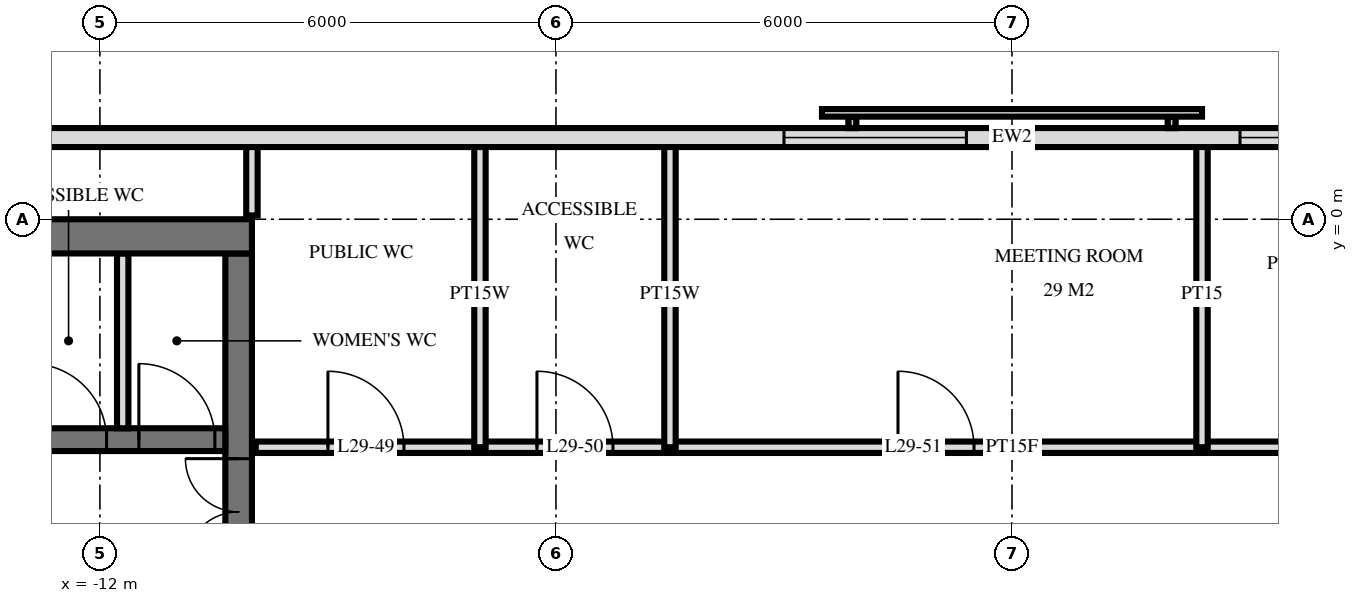
"""IFC4 building model, lengths in metres.
Left out: names, types, materials, properties, quantities, classifications, styles, units other than length and angle.
Written with IfcOpenShell. Run it as: python <this file> out.ifc"""

import sys

from ifc_helpers import new_model, si_unit, direction, frame, frame_2d, origin, place, context, subcontext, project, spatial, rectangle, extrude, element, fill, save


model = new_model("IFC4")
c1 = context("Model", 3, precision=1e-05, world=origin(), true_north=direction((0.0, 1.0)))
c2 = subcontext(c1, "Body", "Model", "MODEL_VIEW")
j1 = project(units=[si_unit("LENGTHUNIT", "METRE"), si_unit("PLANEANGLEUNIT", "RADIAN")], contexts=[c1])
p1 = place(None, origin())
s1 = spatial("IfcSite", under=j1, at=p1, CompositionType="ELEMENT")
p2 = place(p1, origin())
s2 = spatial("IfcBuilding", under=s1, at=p2, CompositionType="ELEMENT")
p3 = place(p2, frame((0.0, 0.0, 116.4)))
s3 = spatial("IfcBuildingStorey", under=s2, at=p3, CompositionType="ELEMENT", Elevation=116.4)
p4 = place(p3, frame((-24.5, -0.225, 0.0), z_axis=(0.0, 0.0, 1.0), x_axis=(1.0, 0.0, 0.0)))
e1 = element("IfcWall", 1, at=p4, inside=s3, PredefinedType="SHEAR", context=c2, shape_type="SweptSolid", body=[
    extrude(rectangle(XDim=14.5, YDim=0.45, at=frame_2d((7.25, 0.0))), origin(), (0.0, 0.0, 1.0), 3.6),
])
p5 = place(p3, frame((-10.175, -14.55, 0.0), z_axis=(0.0, 0.0, 1.0), x_axis=(0.0, 1.0, 0.0)))
e2 = element("IfcWall", 2, at=p5, inside=s3, PredefinedType="SHEAR", context=c2, shape_type="SweptSolid", body=[
    extrude(rectangle(XDim=14.1, YDim=0.35, at=frame_2d((7.05, 0.0))), origin(), (0.0, 0.0, 1.0), 3.6),
])
p6 = place(p5, frame((8.4, 0.0, 0.0)))
e3 = element("IfcOpeningElement", 3, at=p6, cuts=e2, PredefinedType="OPENING", context=c2, shape_type="SweptSolid", body=[
    extrude(rectangle(XDim=1.4, YDim=2.4, at=frame_2d((0.7, 1.2))), frame((0.0, 0.185, 0.0), z_axis=(0.0, -1.0, 0.0), x_axis=(1.0, 0.0, 0.0)), (0.0, 0.0, 1.0), 0.37),
])
p7 = place(p5, frame((10.0, 0.0, 0.0)))
e4 = element("IfcOpeningElement", 4, at=p7, cuts=e2, PredefinedType="OPENING", context=c2, shape_type="SweptSolid", body=[
    extrude(rectangle(XDim=1.4, YDim=2.4, at=frame_2d((0.7, 1.2))), frame((0.0, 0.185, 0.0), z_axis=(0.0, -1.0, 0.0), x_axis=(1.0, 0.0, 0.0)), (0.0, 0.0, 1.0), 0.37),
])
p8 = place(p5, frame((4.0, 0.0, 0.0)))
e5 = element("IfcOpeningElement", 5, at=p8, cuts=e2, PredefinedType="OPENING", context=c2, shape_type="SweptSolid", body=[
    extrude(rectangle(XDim=1.2, YDim=2.1, at=frame_2d((0.6, 1.05))), frame((0.0, 0.185, 0.0), z_axis=(0.0, -1.0, 0.0), x_axis=(1.0, 0.0, 0.0)), (0.0, 0.0, 1.0), 0.37),
])
p9 = place(p3, frame((-24.05, -2.9, 0.0), z_axis=(0.0, 0.0, 1.0), x_axis=(1.0, 0.0, 0.0)))
e6 = element("IfcWall", 6, at=p9, inside=s3, PredefinedType="SHEAR", context=c2, shape_type="SweptSolid", body=[
    extrude(rectangle(XDim=13.7, YDim=0.3, at=frame_2d((6.85, 0.0))), origin(), (0.0, 0.0, 1.0), 3.6),
])
p10 = place(p9, frame((0.55, 0.0, 0.0)))
e7 = element("IfcOpeningElement", 7, at=p10, cuts=e6, PredefinedType="OPENING", context=c2, shape_type="SweptSolid", body=[
    extrude(rectangle(XDim=1.1, YDim=2.1, at=frame_2d((0.55, 1.05))), frame((0.0, 0.16, 0.0), z_axis=(0.0, -1.0, 0.0), x_axis=(1.0, 0.0, 0.0)), (0.0, 0.0, 1.0), 0.32),
])
p11 = place(p9, frame((6.613, 0.0, 0.0)))
e8 = element("IfcOpeningElement", 8, at=p11, cuts=e6, PredefinedType="OPENING", context=c2, shape_type="SweptSolid", body=[
    extrude(rectangle(XDim=0.9, YDim=2.1, at=frame_2d((0.45, 1.05))), frame((0.0, 0.16, 0.0), z_axis=(0.0, -1.0, 0.0), x_axis=(1.0, 0.0, 0.0)), (0.0, 0.0, 1.0), 0.32),
])
p12 = place(p9, frame((5.188, 0.0, 0.0)))
e9 = element("IfcOpeningElement", 9, at=p12, cuts=e6, PredefinedType="OPENING", context=c2, shape_type="SweptSolid", body=[
    extrude(rectangle(XDim=0.9, YDim=2.1, at=frame_2d((0.45, 1.05))), frame((0.0, 0.16, 0.0), z_axis=(0.0, -1.0, 0.0), x_axis=(1.0, 0.0, 0.0)), (0.0, 0.0, 1.0), 0.32),
])
p13 = place(p9, frame((12.562, 0.0, 0.0)))
e10 = element("IfcOpeningElement", 10, at=p13, cuts=e6, PredefinedType="OPENING", context=c2, shape_type="SweptSolid", body=[
    extrude(rectangle(XDim=1.0, YDim=2.1, at=frame_2d((0.5, 1.05))), frame((0.0, 0.16, 0.0), z_axis=(0.0, -1.0, 0.0), x_axis=(1.0, 0.0, 0.0)), (0.0, 0.0, 1.0), 0.32),
])
p14 = place(p9, frame((11.137, 0.0, 0.0)))
e11 = element("IfcOpeningElement", 11, at=p14, cuts=e6, PredefinedType="OPENING", context=c2, shape_type="SweptSolid", body=[
    extrude(rectangle(XDim=1.0, YDim=2.1, at=frame_2d((0.5, 1.05))), frame((0.0, 0.16, 0.0), z_axis=(0.0, -1.0, 0.0), x_axis=(1.0, 0.0, 0.0)), (0.0, 0.0, 1.0), 0.32),
])
p15 = place(p9, frame((8.85, 0.0, 0.0)))
e12 = element("IfcOpeningElement", 12, at=p15, cuts=e6, PredefinedType="OPENING", context=c2, shape_type="SweptSolid", body=[
    extrude(rectangle(XDim=1.0, YDim=2.1, at=frame_2d((0.5, 1.05))), frame((0.0, 0.16, 0.0), z_axis=(0.0, -1.0, 0.0), x_axis=(1.0, 0.0, 0.0)), (0.0, 0.0, 1.0), 0.32),
])
p16 = place(p9, frame((3.0, 0.0, 0.0)))
e13 = element("IfcOpeningElement", 13, at=p16, cuts=e6, PredefinedType="OPENING", context=c2, shape_type="SweptSolid", body=[
    extrude(rectangle(XDim=1.0, YDim=2.1, at=frame_2d((0.5, 1.05))), frame((0.0, 0.16, 0.0), z_axis=(0.0, -1.0, 0.0), x_axis=(1.0, 0.0, 0.0)), (0.0, 0.0, 1.0), 0.32),
])
p17 = place(p3, frame((23.675, 1.075, 0.0), z_axis=(0.0, 0.0, 1.0), x_axis=(-1.0, 0.0, 0.0)))
e14 = element("IfcWall", 14, at=p17, inside=s3, PredefinedType="SOLIDWALL", context=c2, shape_type="SweptSolid", body=[
    extrude(rectangle(XDim=47.351, YDim=0.25, at=frame_2d((23.675, 0.0))), origin(), (0.0, 0.0, 1.0), 3.32),
])
p18 = place(p17, frame((15.275, 0.0, 0.3)))
e15 = element("IfcOpeningElement", 15, at=p18, cuts=e14, PredefinedType="OPENING", context=c2, shape_type="SweptSolid", body=[
    extrude(rectangle(XDim=2.4, YDim=2.1, at=frame_2d((1.2, 1.05))), frame((0.0, 0.135, 0.0), z_axis=(0.0, -1.0, 0.0), x_axis=(1.0, 0.0, 0.0)), (0.0, 0.0, 1.0), 0.27),
])
p19 = place(p17, frame((18.275, 0.0, 0.3)))
e16 = element("IfcOpeningElement", 16, at=p19, cuts=e14, PredefinedType="OPENING", context=c2, shape_type="SweptSolid", body=[
    extrude(rectangle(XDim=2.4, YDim=2.1, at=frame_2d((1.2, 1.05))), frame((0.0, 0.135, 0.0), z_axis=(0.0, -1.0, 0.0), x_axis=(1.0, 0.0, 0.0)), (0.0, 0.0, 1.0), 0.27),
])
p20 = place(p17, frame((24.275, 0.0, 0.3)))
e17 = element("IfcOpeningElement", 17, at=p20, cuts=e14, PredefinedType="OPENING", context=c2, shape_type="SweptSolid", body=[
    extrude(rectangle(XDim=2.4, YDim=2.1, at=frame_2d((1.2, 1.05))), frame((0.0, 0.135, 0.0), z_axis=(0.0, -1.0, 0.0), x_axis=(1.0, 0.0, 0.0)), (0.0, 0.0, 1.0), 0.27),
])
p21 = place(p3, frame((-11.7, -2.75, 0.0), z_axis=(0.0, 0.0, 1.0), x_axis=(0.0, 1.0, 0.0)))
e18 = element("IfcWall", 18, at=p21, inside=s3, PredefinedType="PARTITIONING", context=c2, shape_type="SweptSolid", body=[
    extrude(rectangle(XDim=2.3, YDim=0.15, at=frame_2d((1.15, 0.0))), origin(), (0.0, 0.0, 1.0), 3.3),
])
p22 = place(p3, frame((2.5, -3.0, 0.0), z_axis=(0.0, 0.0, 1.0), x_axis=(0.0, 1.0, 0.0)))
e19 = element("IfcWall", 19, at=p22, inside=s3, PredefinedType="PARTITIONING", context=c2, shape_type="SweptSolid", body=[
    extrude(rectangle(XDim=4.02, YDim=0.15, at=frame_2d((2.01, 0.0))), origin(), (0.0, 0.0, 1.0), 3.32),
])
for number, where, z_axis, x_axis in (
    (20, (-4.5, -3.0, 0.0), (0.0, 0.0, 1.0), (0.0, 1.0, 0.0)),
    (21, (-7.0, -3.0, 0.0), (0.0, 0.0, 1.0), (0.0, 1.0, 0.0)),
):
    element("IfcWall", number, at=place(p3, frame(where, z_axis=z_axis, x_axis=x_axis)), inside=s3, PredefinedType="PLUMBINGWALL", context=c2, shape_type="SweptSolid", body=[
        extrude(rectangle(XDim=4.02, YDim=0.15, at=frame_2d((2.01, 0.0))), origin(), (0.0, 0.0, 1.0), 3.32),
    ])
p23 = place(p3, frame((-10.0, 0.05, 0.0), z_axis=(0.0, 0.0, 1.0), x_axis=(0.0, 1.0, 0.0)))
e22 = element("IfcWall", 22, at=p23, inside=s3, PredefinedType="PLUMBINGWALL", context=c2, shape_type="SweptSolid", body=[
    extrude(rectangle(XDim=0.97, YDim=0.15, at=frame_2d((0.485, 0.0))), origin(), (0.0, 0.0, 1.0), 3.32),
])
p24 = place(p3, frame((-9.95, -3.0, 0.0), z_axis=(0.0, 0.0, 1.0), x_axis=(1.0, 0.0, 0.0)))
e23 = element("IfcWall", 23, at=p24, inside=s3, PredefinedType="PARTITIONING", context=c2, shape_type="SweptSolid", body=[
    extrude(rectangle(XDim=19.9, YDim=0.15, at=frame_2d((9.95, 0.0))), origin(), (0.0, 0.0, 1.0), 3.32),
])
p25 = place(p24, frame((0.95, 0.0, 0.0)))
e24 = element("IfcOpeningElement", 24, at=p25, cuts=e23, PredefinedType="OPENING", context=c2, shape_type="SweptSolid", body=[
    extrude(rectangle(XDim=1.0, YDim=2.1, at=frame_2d((0.5, 1.05))), frame((0.0, 0.085, 0.0), z_axis=(0.0, -1.0, 0.0), x_axis=(1.0, 0.0, 0.0)), (0.0, 0.0, 1.0), 0.17),
])
p26 = place(p24, frame((3.7, 0.0, 0.0)))
e25 = element("IfcOpeningElement", 25, at=p26, cuts=e23, PredefinedType="OPENING", context=c2, shape_type="SweptSolid", body=[
    extrude(rectangle(XDim=1.0, YDim=2.1, at=frame_2d((0.5, 1.05))), frame((0.0, 0.085, 0.0), z_axis=(0.0, -1.0, 0.0), x_axis=(1.0, 0.0, 0.0)), (0.0, 0.0, 1.0), 0.17),
])
p27 = place(p24, frame((8.45, 0.0, 0.0)))
e26 = element("IfcOpeningElement", 26, at=p27, cuts=e23, PredefinedType="OPENING", context=c2, shape_type="SweptSolid", body=[
    extrude(rectangle(XDim=1.0, YDim=2.1, at=frame_2d((0.5, 1.05))), frame((0.0, 0.085, 0.0), z_axis=(0.0, -1.0, 0.0), x_axis=(1.0, 0.0, 0.0)), (0.0, 0.0, 1.0), 0.17),
])
p28 = place(p24, frame((15.7, 0.0, 0.0)))
e27 = element("IfcOpeningElement", 27, at=p28, cuts=e23, PredefinedType="OPENING", context=c2, shape_type="SweptSolid", body=[
    extrude(rectangle(XDim=1.0, YDim=2.1, at=frame_2d((0.5, 1.05))), frame((0.0, 0.085, 0.0), z_axis=(0.0, -1.0, 0.0), x_axis=(1.0, 0.0, 0.0)), (0.0, 0.0, 1.0), 0.17),
])
p29 = place(p19, origin())
e28 = element("IfcWindow", 28, at=p29, inside=s3, PartitioningType="SINGLE_PANEL", PredefinedType="WINDOW", context=c2, shape_type="SweptSolid", body=[
    extrude(rectangle(XDim=2.4, YDim=2.1, at=frame_2d((1.2, 1.05))), frame((0.0, 0.03, 0.0), z_axis=(0.0, -1.0, 0.0), x_axis=(1.0, 0.0, 0.0)), (0.0, 0.0, 1.0), 0.06),
])
fill(e16, e28)
p30 = place(p20, origin())
e29 = element("IfcWindow", 29, at=p30, inside=s3, PartitioningType="SINGLE_PANEL", PredefinedType="WINDOW", context=c2, shape_type="SweptSolid", body=[
    extrude(rectangle(XDim=2.4, YDim=2.1, at=frame_2d((1.2, 1.05))), frame((0.0, 0.03, 0.0), z_axis=(0.0, -1.0, 0.0), x_axis=(1.0, 0.0, 0.0)), (0.0, 0.0, 1.0), 0.06),
])
fill(e17, e29)
p31 = place(p7, origin())
e30 = element("IfcDoor", 30, at=p31, inside=s3, OperationType="DOUBLE_DOOR_SINGLE_SWING", PredefinedType="DOOR", context=c2, shape_type="SweptSolid", body=[
    extrude(rectangle(XDim=1.4, YDim=2.4, at=frame_2d((0.7, 1.2))), frame((0.0, 0.025, 0.0), z_axis=(0.0, -1.0, 0.0), x_axis=(1.0, 0.0, 0.0)), (0.0, 0.0, 1.0), 0.05),
])
fill(e4, e30)
p32 = place(p13, origin())
e31 = element("IfcDoor", 31, at=p32, inside=s3, OperationType="SINGLE_SWING_RIGHT", PredefinedType="DOOR", context=c2, shape_type="SweptSolid", body=[
    extrude(rectangle(XDim=1.0, YDim=2.1, at=frame_2d((0.5, 1.05))), frame((0.0, 0.025, 0.0), z_axis=(0.0, -1.0, 0.0), x_axis=(1.0, 0.0, 0.0)), (0.0, 0.0, 1.0), 0.05),
])
fill(e10, e31)
p33 = place(p14, origin())
e32 = element("IfcDoor", 32, at=p33, inside=s3, OperationType="SINGLE_SWING_RIGHT", PredefinedType="DOOR", context=c2, shape_type="SweptSolid", body=[
    extrude(rectangle(XDim=1.0, YDim=2.1, at=frame_2d((0.5, 1.05))), frame((0.0, 0.025, 0.0), z_axis=(0.0, -1.0, 0.0), x_axis=(1.0, 0.0, 0.0)), (0.0, 0.0, 1.0), 0.05),
])
fill(e11, e32)
p34 = place(p25, origin())
e33 = element("IfcDoor", 33, at=p34, inside=s3, OperationType="SINGLE_SWING_RIGHT", PredefinedType="DOOR", context=c2, shape_type="SweptSolid", body=[
    extrude(rectangle(XDim=1.0, YDim=2.1, at=frame_2d((0.5, 1.05))), frame((0.0, 0.025, 0.0), z_axis=(0.0, -1.0, 0.0), x_axis=(1.0, 0.0, 0.0)), (0.0, 0.0, 1.0), 0.05),
])
fill(e24, e33)
p35 = place(p26, origin())
e34 = element("IfcDoor", 34, at=p35, inside=s3, OperationType="SINGLE_SWING_RIGHT", PredefinedType="DOOR", context=c2, shape_type="SweptSolid", body=[
    extrude(rectangle(XDim=1.0, YDim=2.1, at=frame_2d((0.5, 1.05))), frame((0.0, 0.025, 0.0), z_axis=(0.0, -1.0, 0.0), x_axis=(1.0, 0.0, 0.0)), (0.0, 0.0, 1.0), 0.05),
])
fill(e25, e34)
p36 = place(p27, origin())
e35 = element("IfcDoor", 35, at=p36, inside=s3, OperationType="SINGLE_SWING_RIGHT", PredefinedType="DOOR", context=c2, shape_type="SweptSolid", body=[
    extrude(rectangle(XDim=1.0, YDim=2.1, at=frame_2d((0.5, 1.05))), frame((0.0, 0.025, 0.0), z_axis=(0.0, -1.0, 0.0), x_axis=(1.0, 0.0, 0.0)), (0.0, 0.0, 1.0), 0.05),
])
fill(e26, e35)
save(model, sys.argv[1])
